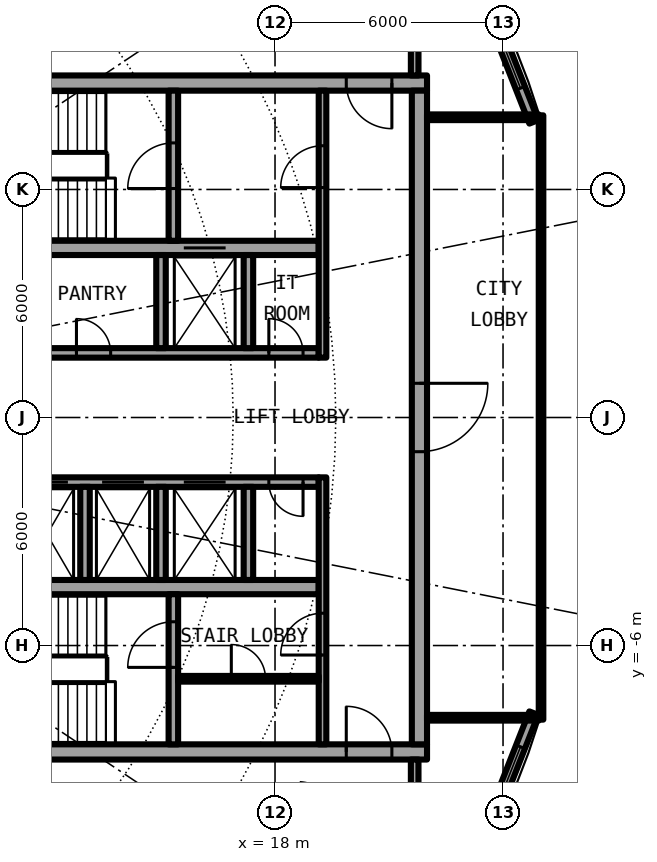
"""IFC4 building model, lengths in metres.
Left out: names, types, materials, properties, quantities, classifications, styles, units other than length and angle.
Written with IfcOpenShell. Run it as: python <this file> out.ifc"""

import sys

from ifc_helpers import new_model, si_unit, direction, frame, frame_2d, origin, place, context, subcontext, project, spatial, rectangle, extrude, element, fill, save


model = new_model("IFC4")
c1 = context("Model", 3, precision=1e-05, world=origin(), true_north=direction((0.0, 1.0)))
c2 = subcontext(c1, "Body", "Model", "MODEL_VIEW")
j1 = project(units=[si_unit("LENGTHUNIT", "METRE"), si_unit("PLANEANGLEUNIT", "RADIAN")], contexts=[c1])
p1 = place(None, origin())
s1 = spatial("IfcSite", under=j1, at=p1, CompositionType="ELEMENT")
p2 = place(p1, origin())
s2 = spatial("IfcBuilding", under=s1, at=p2, CompositionType="ELEMENT")
p3 = place(p2, frame((0.0, 0.0, 237.1)))
s3 = spatial("IfcBuildingStorey", under=s2, at=p3, CompositionType="ELEMENT", Elevation=237.1)
p4 = place(p3, frame((24.809, 7.779, 0.0), z_axis=(0.0, 0.0, 1.0), x_axis=(-0.366351636034, 0.930476479432, 0.0)))
e1 = element("IfcWall", 1, at=p4, inside=s3, PredefinedType="SOLIDWALL", context=c2, shape_type="SweptSolid", body=[
    extrude(rectangle(XDim=3.705, YDim=0.25, at=frame_2d((1.852, 0.0))), origin(), (0.0, 0.0, 1.0), 2.7),
])
p5 = place(p4, frame((0.952, 0.0, 0.3)))
e2 = element("IfcOpeningElement", 2, at=p5, cuts=e1, PredefinedType="OPENING", context=c2, shape_type="SweptSolid", body=[
    extrude(rectangle(XDim=1.8, YDim=2.1, at=frame_2d((0.9, 1.05))), frame((0.0, 0.135, 0.0), z_axis=(0.0, -1.0, 0.0), x_axis=(1.0, 0.0, 0.0)), (0.0, 0.0, 1.0), 0.27),
])
p6 = place(p3, frame((23.452, -11.226, 0.0), z_axis=(0.0, 0.0, 1.0), x_axis=(0.366351636034, 0.930476479432, 0.0)))
e3 = element("IfcWall", 3, at=p6, inside=s3, PredefinedType="SOLIDWALL", context=c2, shape_type="SweptSolid", body=[
    extrude(rectangle(XDim=3.705, YDim=0.25, at=frame_2d((1.852, 0.0))), origin(), (0.0, 0.0, 1.0), 2.7),
])
p7 = place(p6, frame((0.952, 0.0, 0.3)))
e4 = element("IfcOpeningElement", 4, at=p7, cuts=e3, PredefinedType="OPENING", context=c2, shape_type="SweptSolid", body=[
    extrude(rectangle(XDim=1.8, YDim=2.1, at=frame_2d((0.9, 1.05))), frame((0.0, 0.135, 0.0), z_axis=(0.0, -1.0, 0.0), x_axis=(1.0, 0.0, 0.0)), (0.0, 0.0, 1.0), 0.27),
])
p8 = place(p3, frame((22.0, 8.8, 0.0), z_axis=(0.0, 0.0, 1.0), x_axis=(-1.0, 0.0, 0.0)))
e5 = element("IfcWall", 5, at=p8, inside=s3, PredefinedType="SHEAR", context=c2, shape_type="SweptSolid", body=[
    extrude(rectangle(XDim=13.4, YDim=0.4, at=frame_2d((6.7, 0.0))), origin(), (0.0, 0.0, 1.0), 3.05),
])
p9 = place(p8, frame((0.925, 0.0, 0.0)))
e6 = element("IfcOpeningElement", 6, at=p9, cuts=e5, PredefinedType="OPENING", context=c2, shape_type="SweptSolid", body=[
    extrude(rectangle(XDim=1.2, YDim=2.3, at=frame_2d((0.6, 1.15))), frame((0.0, 0.21, 0.0), z_axis=(0.0, -1.0, 0.0), x_axis=(1.0, 0.0, 0.0)), (0.0, 0.0, 1.0), 0.42),
])
p10 = place(p3, frame((8.6, -8.8, 0.0), z_axis=(0.0, 0.0, 1.0), x_axis=(1.0, 0.0, 0.0)))
e7 = element("IfcWall", 7, at=p10, inside=s3, PredefinedType="SHEAR", context=c2, shape_type="SweptSolid", body=[
    extrude(rectangle(XDim=13.4, YDim=0.4, at=frame_2d((6.7, 0.0))), origin(), (0.0, 0.0, 1.0), 3.05),
])
p11 = place(p10, frame((11.275, 0.0, 0.0)))
e8 = element("IfcOpeningElement", 8, at=p11, cuts=e7, PredefinedType="OPENING", context=c2, shape_type="SweptSolid", body=[
    extrude(rectangle(XDim=1.2, YDim=2.3, at=frame_2d((0.6, 1.15))), frame((0.0, 0.21, 0.0), z_axis=(0.0, -1.0, 0.0), x_axis=(1.0, 0.0, 0.0)), (0.0, 0.0, 1.0), 0.42),
])
p12 = place(p3, frame((21.8, 8.6, 0.0), z_axis=(0.0, 0.0, 1.0), x_axis=(0.0, -1.0, 0.0)))
e9 = element("IfcWall", 9, at=p12, inside=s3, PredefinedType="SHEAR", context=c2, shape_type="SweptSolid", body=[
    extrude(rectangle(XDim=17.2, YDim=0.4, at=frame_2d((8.6, 0.0))), origin(), (0.0, 0.0, 1.0), 3.05),
])
p13 = place(p12, frame((7.7, 0.0, 0.0)))
e10 = element("IfcOpeningElement", 10, at=p13, cuts=e9, PredefinedType="OPENING", context=c2, shape_type="SweptSolid", body=[
    extrude(rectangle(XDim=1.8, YDim=2.3, at=frame_2d((0.9, 1.15))), frame((0.0, 0.21, 0.0), z_axis=(0.0, -1.0, 0.0), x_axis=(1.0, 0.0, 0.0)), (0.0, 0.0, 1.0), 0.42),
])
p14 = place(p3, frame((9.0, 1.7, 0.0), z_axis=(0.0, 0.0, 1.0), x_axis=(1.0, 0.0, 0.0)))
e11 = element("IfcWall", 11, at=p14, inside=s3, PredefinedType="SHEAR", context=c2, shape_type="SweptSolid", body=[
    extrude(rectangle(XDim=10.15, YDim=0.25, at=frame_2d((5.075, 0.0))), origin(), (0.0, 0.0, 1.0), 3.05),
])
p15 = place(p14, frame((0.762, 0.0, 0.0)))
e12 = element("IfcOpeningElement", 12, at=p15, cuts=e11, PredefinedType="OPENING", context=c2, shape_type="SweptSolid", body=[
    extrude(rectangle(XDim=0.9, YDim=2.3, at=frame_2d((0.45, 1.15))), frame((0.0, 0.135, 0.0), z_axis=(0.0, -1.0, 0.0), x_axis=(1.0, 0.0, 0.0)), (0.0, 0.0, 1.0), 0.27),
])
p16 = place(p14, frame((3.775, 0.0, 0.0)))
e13 = element("IfcOpeningElement", 13, at=p16, cuts=e11, PredefinedType="OPENING", context=c2, shape_type="SweptSolid", body=[
    extrude(rectangle(XDim=0.9, YDim=2.3, at=frame_2d((0.45, 1.15))), frame((0.0, 0.135, 0.0), z_axis=(0.0, -1.0, 0.0), x_axis=(1.0, 0.0, 0.0)), (0.0, 0.0, 1.0), 0.27),
])
p17 = place(p14, frame((8.837, 0.0, 0.0)))
e14 = element("IfcOpeningElement", 14, at=p17, cuts=e11, PredefinedType="OPENING", context=c2, shape_type="SweptSolid", body=[
    extrude(rectangle(XDim=0.9, YDim=2.3, at=frame_2d((0.45, 1.15))), frame((0.0, 0.135, 0.0), z_axis=(0.0, -1.0, 0.0), x_axis=(1.0, 0.0, 0.0)), (0.0, 0.0, 1.0), 0.27),
])
p18 = place(p3, frame((9.0, 4.462, 0.0), z_axis=(0.0, 0.0, 1.0), x_axis=(1.0, 0.0, 0.0)))
e15 = element("IfcWall", 15, at=p18, inside=s3, PredefinedType="SHEAR", context=c2, shape_type="SweptSolid", body=[
    extrude(rectangle(XDim=10.15, YDim=0.375, at=frame_2d((5.075, 0.0))), origin(), (0.0, 0.0, 1.0), 3.05),
])
p19 = place(p18, frame((6.6, 0.0, 0.0)))
e16 = element("IfcOpeningElement", 16, at=p19, cuts=e15, PredefinedType="OPENING", context=c2, shape_type="SweptSolid", body=[
    extrude(rectangle(XDim=1.1, YDim=2.3, at=frame_2d((0.55, 1.15))), frame((0.0, 0.198, 0.0), z_axis=(0.0, -1.0, 0.0), x_axis=(1.0, 0.0, 0.0)), (0.0, 0.0, 1.0), 0.395),
])
p20 = place(p3, frame((15.325, 4.65, 0.0), z_axis=(0.0, 0.0, 1.0), x_axis=(0.0, 1.0, 0.0)))
e17 = element("IfcWall", 17, at=p20, inside=s3, PredefinedType="SHEAR", context=c2, shape_type="SweptSolid", body=[
    extrude(rectangle(XDim=3.95, YDim=0.25, at=frame_2d((1.975, 0.0))), origin(), (0.0, 0.0, 1.0), 3.05),
])
p21 = place(p20, frame((1.375, 0.0, 0.0)))
e18 = element("IfcOpeningElement", 18, at=p21, cuts=e17, PredefinedType="OPENING", context=c2, shape_type="SweptSolid", body=[
    extrude(rectangle(XDim=1.2, YDim=2.3, at=frame_2d((0.6, 1.15))), frame((0.0, 0.135, 0.0), z_axis=(0.0, -1.0, 0.0), x_axis=(1.0, 0.0, 0.0)), (0.0, 0.0, 1.0), 0.27),
])
for number, where, z_axis, x_axis in (
    (19, (15.0, 1.825, 0.0), (0.0, 0.0, 1.0), (0.0, 1.0, 0.0)),
    (20, (17.3, 1.825, 0.0), (0.0, 0.0, 1.0), (0.0, 1.0, 0.0)),
):
    element("IfcWall", number, at=place(p3, frame(where, z_axis=z_axis, x_axis=x_axis)), inside=s3, PredefinedType="SOLIDWALL", context=c2, shape_type="SweptSolid", body=[
        extrude(rectangle(XDim=2.45, YDim=0.25, at=frame_2d((1.225, 0.0))), origin(), (0.0, 0.0, 1.0), 2.7),
    ])
p22 = place(p3, frame((19.25, 1.575, 0.0), z_axis=(0.0, 0.0, 1.0), x_axis=(0.0, 1.0, 0.0)))
e21 = element("IfcWall", 21, at=p22, inside=s3, PredefinedType="SOLIDWALL", context=c2, shape_type="SweptSolid", body=[
    extrude(rectangle(XDim=7.025, YDim=0.2, at=frame_2d((3.513, 0.0))), origin(), (0.0, 0.0, 1.0), 2.7),
])
p23 = place(p22, frame((4.475, 0.0, 0.0)))
e22 = element("IfcOpeningElement", 22, at=p23, cuts=e21, PredefinedType="OPENING", context=c2, shape_type="SweptSolid", body=[
    extrude(rectangle(XDim=1.1, YDim=2.3, at=frame_2d((0.55, 1.15))), frame((0.0, 0.11, 0.0), z_axis=(0.0, -1.0, 0.0), x_axis=(1.0, 0.0, 0.0)), (0.0, 0.0, 1.0), 0.22),
])
p24 = place(p3, frame((19.15, -1.7, 0.0), z_axis=(0.0, 0.0, 1.0), x_axis=(-1.0, 0.0, 0.0)))
e23 = element("IfcWall", 23, at=p24, inside=s3, PredefinedType="SHEAR", context=c2, shape_type="SweptSolid", body=[
    extrude(rectangle(XDim=10.15, YDim=0.25, at=frame_2d((5.075, 0.0))), origin(), (0.0, 0.0, 1.0), 3.05),
])
p25 = place(p24, frame((8.663, 0.0, 0.0)))
e24 = element("IfcOpeningElement", 24, at=p25, cuts=e23, PredefinedType="OPENING", context=c2, shape_type="SweptSolid", body=[
    extrude(rectangle(XDim=1.1, YDim=2.3, at=frame_2d((0.55, 1.15))), frame((0.0, 0.135, 0.0), z_axis=(0.0, -1.0, 0.0), x_axis=(1.0, 0.0, 0.0)), (0.0, 0.0, 1.0), 0.27),
])
p26 = place(p24, frame((6.6, 0.0, 0.0)))
e25 = element("IfcOpeningElement", 25, at=p26, cuts=e23, PredefinedType="OPENING", context=c2, shape_type="SweptSolid", body=[
    extrude(rectangle(XDim=1.1, YDim=2.3, at=frame_2d((0.55, 1.15))), frame((0.0, 0.135, 0.0), z_axis=(0.0, -1.0, 0.0), x_axis=(1.0, 0.0, 0.0)), (0.0, 0.0, 1.0), 0.27),
])
p27 = place(p24, frame((4.6, 0.0, 0.0)))
e26 = element("IfcOpeningElement", 26, at=p27, cuts=e23, PredefinedType="OPENING", context=c2, shape_type="SweptSolid", body=[
    extrude(rectangle(XDim=1.1, YDim=2.3, at=frame_2d((0.55, 1.15))), frame((0.0, 0.135, 0.0), z_axis=(0.0, -1.0, 0.0), x_axis=(1.0, 0.0, 0.0)), (0.0, 0.0, 1.0), 0.27),
])
p28 = place(p24, frame((2.45, 0.0, 0.0)))
e27 = element("IfcOpeningElement", 27, at=p28, cuts=e23, PredefinedType="OPENING", context=c2, shape_type="SweptSolid", body=[
    extrude(rectangle(XDim=1.1, YDim=2.3, at=frame_2d((0.55, 1.15))), frame((0.0, 0.135, 0.0), z_axis=(0.0, -1.0, 0.0), x_axis=(1.0, 0.0, 0.0)), (0.0, 0.0, 1.0), 0.27),
])
p29 = place(p24, frame((0.413, 0.0, 0.0)))
e28 = element("IfcOpeningElement", 28, at=p29, cuts=e23, PredefinedType="OPENING", context=c2, shape_type="SweptSolid", body=[
    extrude(rectangle(XDim=0.9, YDim=2.3, at=frame_2d((0.45, 1.15))), frame((0.0, 0.135, 0.0), z_axis=(0.0, -1.0, 0.0), x_axis=(1.0, 0.0, 0.0)), (0.0, 0.0, 1.0), 0.27),
])
p30 = place(p3, frame((9.0, -4.462, 0.0), z_axis=(0.0, 0.0, 1.0), x_axis=(1.0, 0.0, 0.0)))
e29 = element("IfcWall", 29, at=p30, inside=s3, PredefinedType="SHEAR", context=c2, shape_type="SweptSolid", body=[
    extrude(rectangle(XDim=10.15, YDim=0.375, at=frame_2d((5.075, 0.0))), origin(), (0.0, 0.0, 1.0), 3.05),
])
p31 = place(p3, frame((15.325, -8.6, 0.0), z_axis=(0.0, 0.0, 1.0), x_axis=(0.0, 1.0, 0.0)))
e30 = element("IfcWall", 30, at=p31, inside=s3, PredefinedType="SHEAR", context=c2, shape_type="SweptSolid", body=[
    extrude(rectangle(XDim=3.95, YDim=0.25, at=frame_2d((1.975, 0.0))), origin(), (0.0, 0.0, 1.0), 3.05),
])
p32 = place(p31, frame((2.025, 0.0, 0.0)))
e31 = element("IfcOpeningElement", 31, at=p32, cuts=e30, PredefinedType="OPENING", context=c2, shape_type="SweptSolid", body=[
    extrude(rectangle(XDim=1.2, YDim=2.3, at=frame_2d((0.6, 1.15))), frame((0.0, 0.135, 0.0), z_axis=(0.0, -1.0, 0.0), x_axis=(1.0, 0.0, 0.0)), (0.0, 0.0, 1.0), 0.27),
])
for number, where, z_axis, x_axis in (
    (32, (15.0, -1.825, 0.0), (0.0, 0.0, 1.0), (0.0, -1.0, 0.0)),
    (33, (17.3, -1.825, 0.0), (0.0, 0.0, 1.0), (0.0, -1.0, 0.0)),
):
    element("IfcWall", number, at=place(p3, frame(where, z_axis=z_axis, x_axis=x_axis)), inside=s3, PredefinedType="SOLIDWALL", context=c2, shape_type="SweptSolid", body=[
        extrude(rectangle(XDim=2.45, YDim=0.25, at=frame_2d((1.225, 0.0))), origin(), (0.0, 0.0, 1.0), 2.7),
    ])
p33 = place(p3, frame((19.25, -8.6, 0.0), z_axis=(0.0, 0.0, 1.0), x_axis=(0.0, 1.0, 0.0)))
e34 = element("IfcWall", 34, at=p33, inside=s3, PredefinedType="SOLIDWALL", context=c2, shape_type="SweptSolid", body=[
    extrude(rectangle(XDim=7.025, YDim=0.2, at=frame_2d((3.513, 0.0))), origin(), (0.0, 0.0, 1.0), 2.7),
])
p34 = place(p33, frame((2.35, 0.0, 0.0)))
e35 = element("IfcOpeningElement", 35, at=p34, cuts=e34, PredefinedType="OPENING", context=c2, shape_type="SweptSolid", body=[
    extrude(rectangle(XDim=1.1, YDim=2.3, at=frame_2d((0.55, 1.15))), frame((0.0, 0.11, 0.0), z_axis=(0.0, -1.0, 0.0), x_axis=(1.0, 0.0, 0.0)), (0.0, 0.0, 1.0), 0.22),
])
p35 = place(p3, frame((13.0, -1.825, 0.0), z_axis=(0.0, 0.0, 1.0), x_axis=(0.0, -1.0, 0.0)))
e36 = element("IfcWall", 36, at=p35, inside=s3, PredefinedType="SOLIDWALL", context=c2, shape_type="SweptSolid", body=[
    extrude(rectangle(XDim=2.45, YDim=0.25, at=frame_2d((1.225, 0.0))), origin(), (0.0, 0.0, 1.0), 2.7),
])
p36 = place(p3, frame((15.45, -6.875, 0.0), z_axis=(0.0, 0.0, 1.0), x_axis=(1.0, 0.0, 0.0)))
e37 = element("IfcWall", 37, at=p36, inside=s3, PredefinedType="PARTITIONING", context=c2, shape_type="SweptSolid", body=[
    extrude(rectangle(XDim=3.7, YDim=0.15, at=frame_2d((1.85, 0.0))), origin(), (0.0, 0.0, 1.0), 2.7),
])
p37 = place(p36, frame((1.4, 0.0, 0.0)))
e38 = element("IfcOpeningElement", 38, at=p37, cuts=e37, PredefinedType="OPENING", context=c2, shape_type="SweptSolid", body=[
    extrude(rectangle(XDim=0.9, YDim=2.3, at=frame_2d((0.45, 1.15))), frame((0.0, 0.085, 0.0), z_axis=(0.0, -1.0, 0.0), x_axis=(1.0, 0.0, 0.0)), (0.0, 0.0, 1.0), 0.17),
])
for number, where, z_axis, x_axis in (
    (39, (22.0, -7.9, 0.0), (0.0, 0.0, 1.0), (1.0, 0.0, 0.0)),
    (40, (22.0, 7.9, 0.0), (0.0, 0.0, 1.0), (1.0, 0.0, 0.0)),
):
    element("IfcWall", number, at=place(p3, frame(where, z_axis=z_axis, x_axis=x_axis)), inside=s3, PredefinedType="PARTITIONING", context=c2, shape_type="SweptSolid", body=[
        extrude(rectangle(XDim=2.94, YDim=0.15, at=frame_2d((1.47, 0.0))), origin(), (0.0, 0.0, 1.0), 2.7),
    ])
p38 = place(p3, frame((25.0, -7.95, 0.0), z_axis=(0.0, 0.0, 1.0), x_axis=(0.0, 1.0, 0.0)))
e41 = element("IfcWall", 41, at=p38, inside=s3, PredefinedType="PARTITIONING", context=c2, shape_type="SweptSolid", body=[
    extrude(rectangle(XDim=15.9, YDim=0.12, at=frame_2d((7.95, 0.0))), origin(), (0.0, 0.0, 1.0), 2.7),
])
p39 = place(p38, frame((0.95, 0.0, 0.1)))
e42 = element("IfcOpeningElement", 42, at=p39, cuts=e41, PredefinedType="OPENING", context=c2, shape_type="SweptSolid", body=[
    extrude(rectangle(XDim=14.0, YDim=2.35, at=frame_2d((7.0, 1.175))), frame((0.0, 0.07, 0.0), z_axis=(0.0, -1.0, 0.0), x_axis=(1.0, 0.0, 0.0)), (0.0, 0.0, 1.0), 0.14),
])
for number, where, z_axis, x_axis in (
    (43, (21.675, -10.8, 0.0), (0.0, 0.0, 1.0), (0.0, 1.0, 0.0)),
    (44, (21.675, 9.0, 0.0), (0.0, 0.0, 1.0), (0.0, 1.0, 0.0)),
):
    element("IfcWall", number, at=place(p3, frame(where, z_axis=z_axis, x_axis=x_axis)), inside=s3, PredefinedType="PARTITIONING", context=c2, shape_type="SweptSolid", body=[
        extrude(rectangle(XDim=1.8, YDim=0.2, at=frame_2d((0.9, 0.0))), origin(), (0.0, 0.0, 1.0), 2.7),
    ])
p40 = place(p5, origin())
e45 = element("IfcWindow", 45, at=p40, inside=s3, PartitioningType="SINGLE_PANEL", PredefinedType="WINDOW", context=c2, shape_type="SweptSolid", body=[
    extrude(rectangle(XDim=1.8, YDim=2.1, at=frame_2d((0.9, 1.05))), frame((0.0, 0.03, 0.0), z_axis=(0.0, -1.0, 0.0), x_axis=(1.0, 0.0, 0.0)), (0.0, 0.0, 1.0), 0.06),
])
fill(e2, e45)
p41 = place(p7, origin())
e46 = element("IfcWindow", 46, at=p41, inside=s3, PartitioningType="SINGLE_PANEL", PredefinedType="WINDOW", context=c2, shape_type="SweptSolid", body=[
    extrude(rectangle(XDim=1.8, YDim=2.1, at=frame_2d((0.9, 1.05))), frame((0.0, 0.03, 0.0), z_axis=(0.0, -1.0, 0.0), x_axis=(1.0, 0.0, 0.0)), (0.0, 0.0, 1.0), 0.06),
])
fill(e4, e46)
p42 = place(p19, origin())
e47 = element("IfcDoor", 47, at=p42, inside=s3, OperationType="DOUBLE_DOOR_SLIDING", PredefinedType="DOOR", context=c2, shape_type="SweptSolid", body=[
    extrude(rectangle(XDim=1.1, YDim=2.3, at=frame_2d((0.55, 1.15))), frame((0.0, 0.025, 0.0), z_axis=(0.0, -1.0, 0.0), x_axis=(1.0, 0.0, 0.0)), (0.0, 0.0, 1.0), 0.05),
])
fill(e16, e47)
p43 = place(p26, origin())
e48 = element("IfcDoor", 48, at=p43, inside=s3, OperationType="DOUBLE_DOOR_SLIDING", PredefinedType="DOOR", context=c2, shape_type="SweptSolid", body=[
    extrude(rectangle(XDim=1.1, YDim=2.3, at=frame_2d((0.55, 1.15))), frame((0.0, 0.025, 0.0), z_axis=(0.0, -1.0, 0.0), x_axis=(1.0, 0.0, 0.0)), (0.0, 0.0, 1.0), 0.05),
])
fill(e25, e48)
p44 = place(p27, origin())
e49 = element("IfcDoor", 49, at=p44, inside=s3, OperationType="DOUBLE_DOOR_SLIDING", PredefinedType="DOOR", context=c2, shape_type="SweptSolid", body=[
    extrude(rectangle(XDim=1.1, YDim=2.3, at=frame_2d((0.55, 1.15))), frame((0.0, 0.025, 0.0), z_axis=(0.0, -1.0, 0.0), x_axis=(1.0, 0.0, 0.0)), (0.0, 0.0, 1.0), 0.05),
])
fill(e26, e49)
p45 = place(p28, origin())
e50 = element("IfcDoor", 50, at=p45, inside=s3, OperationType="DOUBLE_DOOR_SLIDING", PredefinedType="DOOR", context=c2, shape_type="SweptSolid", body=[
    extrude(rectangle(XDim=1.1, YDim=2.3, at=frame_2d((0.55, 1.15))), frame((0.0, 0.025, 0.0), z_axis=(0.0, -1.0, 0.0), x_axis=(1.0, 0.0, 0.0)), (0.0, 0.0, 1.0), 0.05),
])
fill(e27, e50)
p46 = place(p16, origin())
e51 = element("IfcDoor", 51, at=p46, inside=s3, OperationType="SINGLE_SWING_RIGHT", PredefinedType="DOOR", context=c2, shape_type="SweptSolid", body=[
    extrude(rectangle(XDim=0.9, YDim=2.3, at=frame_2d((0.45, 1.15))), frame((0.0, 0.025, 0.0), z_axis=(0.0, -1.0, 0.0), x_axis=(1.0, 0.0, 0.0)), (0.0, 0.0, 1.0), 0.05),
])
fill(e13, e51)
p47 = place(p17, origin())
e52 = element("IfcDoor", 52, at=p47, inside=s3, OperationType="SINGLE_SWING_LEFT", PredefinedType="DOOR", context=c2, shape_type="SweptSolid", body=[
    extrude(rectangle(XDim=0.9, YDim=2.3, at=frame_2d((0.45, 1.15))), frame((0.0, 0.025, 0.0), z_axis=(0.0, -1.0, 0.0), x_axis=(1.0, 0.0, 0.0)), (0.0, 0.0, 1.0), 0.05),
])
fill(e14, e52)
p48 = place(p29, origin())
e53 = element("IfcDoor", 53, at=p48, inside=s3, OperationType="SINGLE_SWING_RIGHT", PredefinedType="DOOR", context=c2, shape_type="SweptSolid", body=[
    extrude(rectangle(XDim=0.9, YDim=2.3, at=frame_2d((0.45, 1.15))), frame((0.0, 0.025, 0.0), z_axis=(0.0, -1.0, 0.0), x_axis=(1.0, 0.0, 0.0)), (0.0, 0.0, 1.0), 0.05),
])
fill(e28, e53)
p49 = place(p37, origin())
e54 = element("IfcDoor", 54, at=p49, inside=s3, OperationType="SINGLE_SWING_LEFT", PredefinedType="DOOR", context=c2, shape_type="SweptSolid", body=[
    extrude(rectangle(XDim=0.9, YDim=2.3, at=frame_2d((0.45, 1.15))), frame((0.0, 0.025, 0.0), z_axis=(0.0, -1.0, 0.0), x_axis=(1.0, 0.0, 0.0)), (0.0, 0.0, 1.0), 0.05),
])
fill(e38, e54)
p50 = place(p21, origin())
e55 = element("IfcDoor", 55, at=p50, inside=s3, OperationType="SINGLE_SWING_LEFT", PredefinedType="DOOR", context=c2, shape_type="SweptSolid", body=[
    extrude(rectangle(XDim=1.2, YDim=2.3, at=frame_2d((0.6, 1.15))), frame((0.0, 0.025, 0.0), z_axis=(0.0, -1.0, 0.0), x_axis=(1.0, 0.0, 0.0)), (0.0, 0.0, 1.0), 0.05),
])
fill(e18, e55)
p51 = place(p32, origin())
e56 = element("IfcDoor", 56, at=p51, inside=s3, OperationType="SINGLE_SWING_LEFT", PredefinedType="DOOR", context=c2, shape_type="SweptSolid", body=[
    extrude(rectangle(XDim=1.2, YDim=2.3, at=frame_2d((0.6, 1.15))), frame((0.0, 0.025, 0.0), z_axis=(0.0, -1.0, 0.0), x_axis=(1.0, 0.0, 0.0)), (0.0, 0.0, 1.0), 0.05),
])
fill(e31, e56)
p52 = place(p23, origin())
e57 = element("IfcDoor", 57, at=p52, inside=s3, OperationType="SINGLE_SWING_LEFT", PredefinedType="DOOR", context=c2, shape_type="SweptSolid", body=[
    extrude(rectangle(XDim=1.1, YDim=2.3, at=frame_2d((0.55, 1.15))), frame((0.0, 0.025, 0.0), z_axis=(0.0, -1.0, 0.0), x_axis=(1.0, 0.0, 0.0)), (0.0, 0.0, 1.0), 0.05),
])
fill(e22, e57)
p53 = place(p34, origin())
e58 = element("IfcDoor", 58, at=p53, inside=s3, OperationType="SINGLE_SWING_RIGHT", PredefinedType="DOOR", context=c2, shape_type="SweptSolid", body=[
    extrude(rectangle(XDim=1.1, YDim=2.3, at=frame_2d((0.55, 1.15))), frame((0.0, 0.025, 0.0), z_axis=(0.0, -1.0, 0.0), x_axis=(1.0, 0.0, 0.0)), (0.0, 0.0, 1.0), 0.05),
])
fill(e35, e58)
p54 = place(p9, origin())
e59 = element("IfcDoor", 59, at=p54, inside=s3, OperationType="SINGLE_SWING_RIGHT", PredefinedType="DOOR", context=c2, shape_type="SweptSolid", body=[
    extrude(rectangle(XDim=1.2, YDim=2.3, at=frame_2d((0.6, 1.15))), frame((0.0, 0.025, 0.0), z_axis=(0.0, -1.0, 0.0), x_axis=(1.0, 0.0, 0.0)), (0.0, 0.0, 1.0), 0.05),
])
fill(e6, e59)
p55 = place(p11, origin())
e60 = element("IfcDoor", 60, at=p55, inside=s3, OperationType="SINGLE_SWING_LEFT", PredefinedType="DOOR", context=c2, shape_type="SweptSolid", body=[
    extrude(rectangle(XDim=1.2, YDim=2.3, at=frame_2d((0.6, 1.15))), frame((0.0, 0.025, 0.0), z_axis=(0.0, -1.0, 0.0), x_axis=(1.0, 0.0, 0.0)), (0.0, 0.0, 1.0), 0.05),
])
fill(e8, e60)
p56 = place(p13, origin())
e61 = element("IfcDoor", 61, at=p56, inside=s3, OperationType="SINGLE_SWING_LEFT", PredefinedType="DOOR", context=c2, shape_type="SweptSolid", body=[
    extrude(rectangle(XDim=1.8, YDim=2.3, at=frame_2d((0.9, 1.15))), frame((0.0, 0.025, 0.0), z_axis=(0.0, -1.0, 0.0), x_axis=(1.0, 0.0, 0.0)), (0.0, 0.0, 1.0), 0.05),
])
fill(e10, e61)
p57 = place(p39, origin())
e62 = element("IfcWindow", 62, at=p57, inside=s3, PartitioningType="SINGLE_PANEL", PredefinedType="WINDOW", context=c2, shape_type="SweptSolid", body=[
    extrude(rectangle(XDim=14.0, YDim=2.35, at=frame_2d((7.0, 1.175))), frame((0.0, 0.03, 0.0), z_axis=(0.0, -1.0, 0.0), x_axis=(1.0, 0.0, 0.0)), (0.0, 0.0, 1.0), 0.06),
])
fill(e42, e62)
save(model, sys.argv[1])
